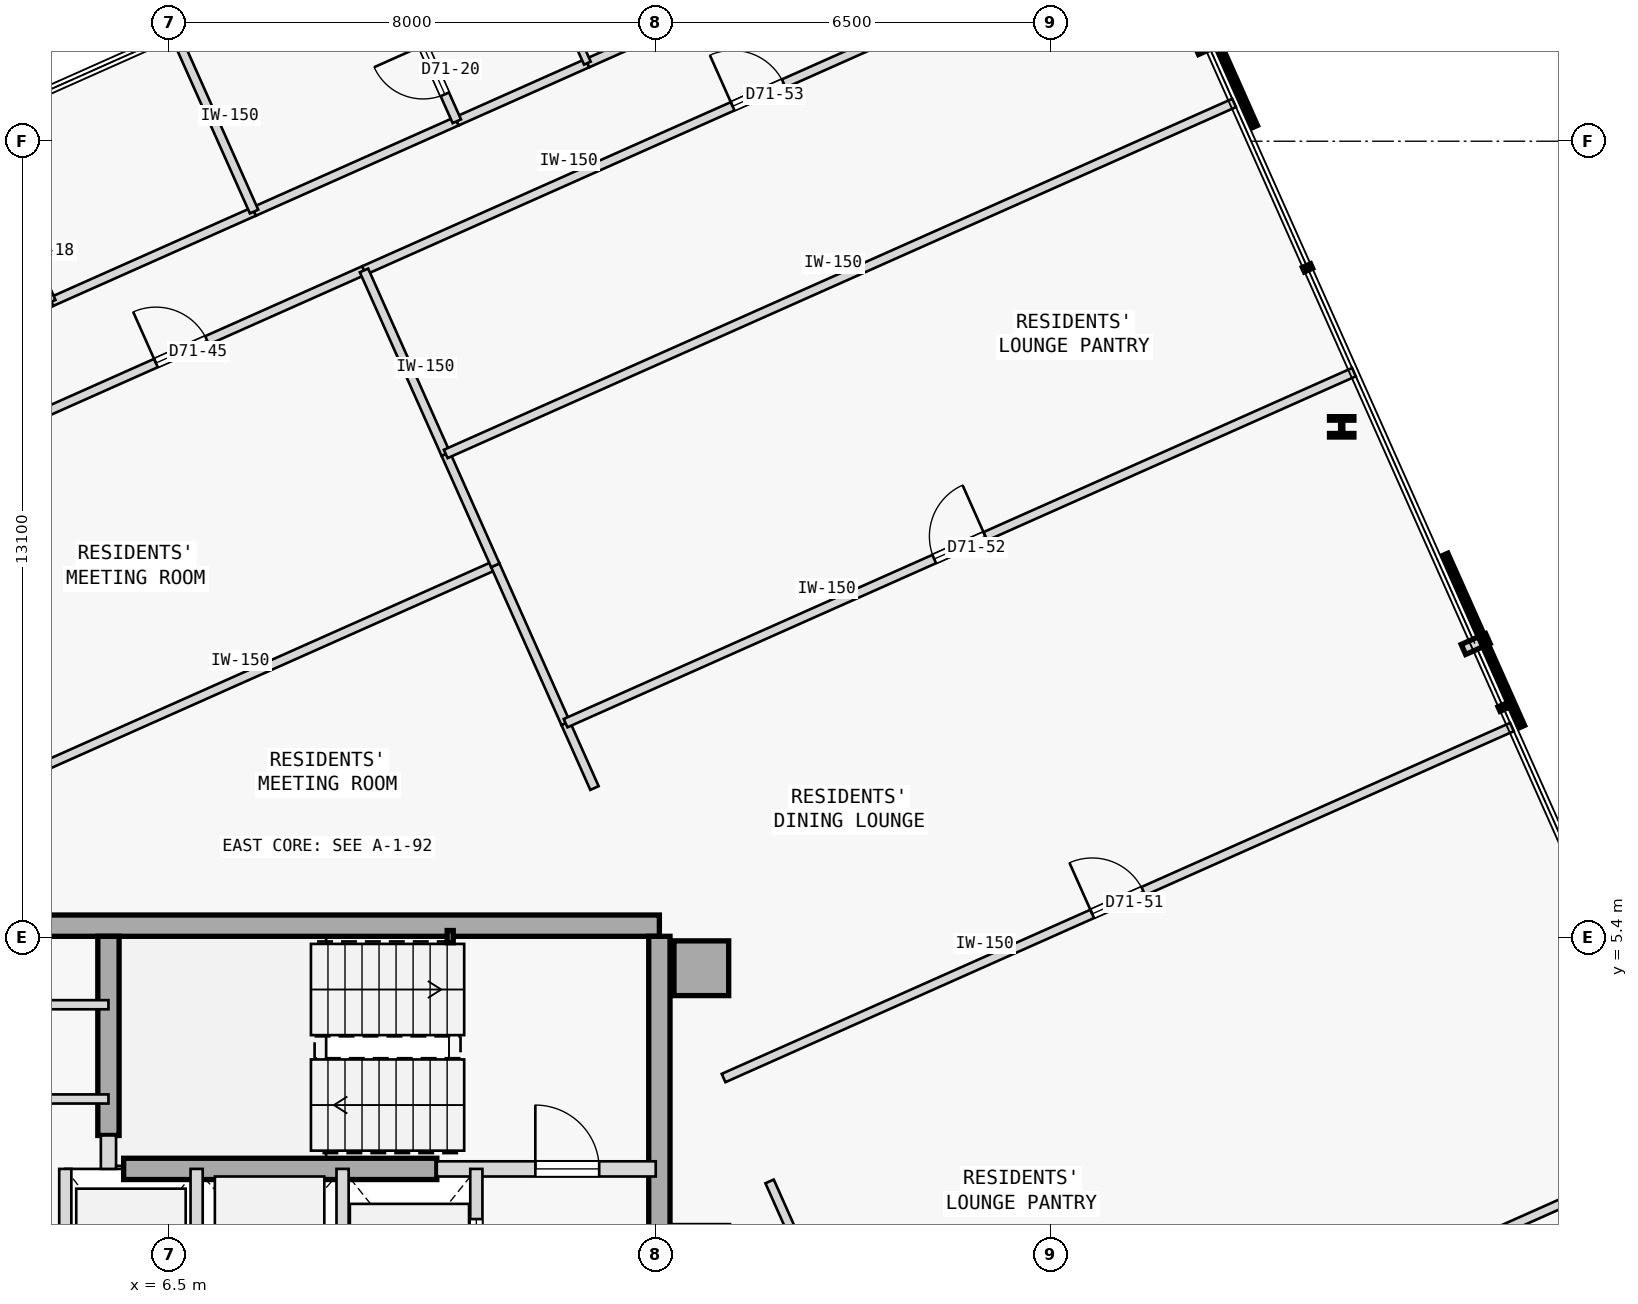
"""IFC4 building model, lengths in metres.
Left out: names, types, materials, properties, quantities, classifications, styles, units other than length and angle.
Written with IfcOpenShell. Run it as: python <this file> out.ifc"""

import sys

from ifc_helpers import new_model, si_unit, direction, frame, frame_2d, origin, origin_2d, place, context, subcontext, project, spatial, rectangle, hollow_rectangle, i_section, extrude, element, fill, save


model = new_model("IFC4")
c1 = context("Model", 3, precision=1e-05, world=origin(), true_north=direction((0.0, 1.0)))
c2 = subcontext(c1, "Body", "Model", "MODEL_VIEW")
j1 = project(units=[si_unit("LENGTHUNIT", "METRE"), si_unit("PLANEANGLEUNIT", "RADIAN")], contexts=[c1])
p1 = place(None, origin())
s1 = spatial("IfcSite", under=j1, at=p1, CompositionType="ELEMENT")
p2 = place(p1, origin())
s2 = spatial("IfcBuilding", under=s1, at=p2, CompositionType="ELEMENT")
p3 = place(p2, frame((0.0, 0.0, 265.55)))
s3 = spatial("IfcBuildingStorey", under=s2, at=p3, CompositionType="ELEMENT", Elevation=265.55)
p4 = place(p3, frame((15.25, 4.9, 0.0), z_axis=(0.0, 0.0, 1.0), x_axis=(1.0, 0.0, 0.0)))
e1 = element("IfcColumn", 1, at=p4, inside=s3, PredefinedType="COLUMN", context=c2, shape_type="SweptSolid", body=[
    extrude(rectangle(XDim=0.9, YDim=0.9, at=origin_2d()), origin(), (0.0, 0.0, 1.0), 3.35),
])
p5 = place(p3, frame((3.15, 5.6, 0.0), z_axis=(0.0, 0.0, 1.0), x_axis=(1.0, 0.0, 0.0)))
e2 = element("IfcWall", 2, at=p5, inside=s3, PredefinedType="SHEAR", context=c2, shape_type="SweptSolid", body=[
    extrude(rectangle(XDim=11.41, YDim=0.35, at=frame_2d((5.705, 0.0))), origin(), (0.0, 0.0, 1.0), 3.125),
])
p6 = place(p3, frame((14.56, -5.425, 0.0), z_axis=(0.0, 0.0, 1.0), x_axis=(0.0, 1.0, 0.0)))
e3 = element("IfcWall", 3, at=p6, inside=s3, PredefinedType="SHEAR", context=c2, shape_type="SweptSolid", body=[
    extrude(rectangle(XDim=10.85, YDim=0.35, at=frame_2d((5.425, 0.0))), origin(), (0.0, 0.0, 1.0), 3.125),
])
p7 = place(p3, frame((5.5, 2.15, 0.0), z_axis=(0.0, 0.0, 1.0), x_axis=(0.0, 1.0, 0.0)))
e4 = element("IfcWall", 4, at=p7, inside=s3, PredefinedType="SHEAR", context=c2, shape_type="SweptSolid", body=[
    extrude(rectangle(XDim=3.275, YDim=0.35, at=frame_2d((1.638, 0.0))), origin(), (0.0, 0.0, 1.0), 3.125),
])
p8 = place(p3, frame((5.75, 1.6, 0.0), z_axis=(0.0, 0.0, 1.0), x_axis=(1.0, 0.0, 0.0)))
e5 = element("IfcWall", 5, at=p8, inside=s3, PredefinedType="SHEAR", context=c2, shape_type="SweptSolid", body=[
    extrude(rectangle(XDim=5.15, YDim=0.35, at=frame_2d((2.575, 0.0))), origin(), (0.0, 0.0, 1.0), 3.125),
])
p9 = place(p3, frame((11.12, 5.42, 0.0), z_axis=(0.0, 0.0, 1.0), x_axis=(1.0, 0.0, 0.0)))
e6 = element("IfcColumn", 6, at=p9, inside=s3, PredefinedType="COLUMN", context=c2, shape_type="SweptSolid", body=[
    extrude(hollow_rectangle(XDim=0.1, YDim=0.2, WallThickness=0.008, at=origin_2d()), origin(), (0.0, 0.0, 1.0), 3.35),
])
p10 = place(p3, frame((25.781, 13.803, 0.0), z_axis=(0.0, 0.0, 1.0), x_axis=(1.0, 0.0, 0.0)))
e7 = element("IfcColumn", 7, at=p10, inside=s3, PredefinedType="COLUMN", context=c2, shape_type="SweptSolid", body=[
    extrude(i_section(OverallWidth=0.401, OverallDepth=0.335, WebThickness=0.036, FlangeThickness=0.058, FilletRadius=0.015, at=origin_2d()), origin(), (0.0, 0.0, 1.0), 3.35),
])
p11 = place(p3, frame((10.9, 1.6, 0.0), z_axis=(0.0, 0.0, 1.0), x_axis=(1.0, 0.0, 0.0)))
e8 = element("IfcWall", 8, at=p11, inside=s3, PredefinedType="STANDARD", context=c2, shape_type="SweptSolid", body=[
    extrude(rectangle(XDim=3.6, YDim=0.25, at=frame_2d((1.8, 0.0))), origin(), (0.0, 0.0, 1.0), 3.125),
])
p12 = place(p11, frame((1.62, 0.0, 0.0)))
e9 = element("IfcOpeningElement", 9, at=p12, cuts=e8, PredefinedType="OPENING", context=c2, shape_type="SweptSolid", body=[
    extrude(rectangle(XDim=1.05, YDim=2.15, at=frame_2d((0.525, 1.075))), frame((0.0, 0.135, 0.0), z_axis=(0.0, -1.0, 0.0), x_axis=(1.0, 0.0, 0.0)), (0.0, 0.0, 1.0), 0.27),
])
p13 = place(p3, frame((5.5, 1.6, 0.0), z_axis=(0.0, 0.0, 1.0), x_axis=(0.0, 1.0, 0.0)))
e10 = element("IfcWall", 10, at=p13, inside=s3, PredefinedType="STANDARD", context=c2, shape_type="SweptSolid", body=[
    extrude(rectangle(XDim=0.55, YDim=0.25, at=frame_2d((0.275, 0.0))), origin(), (0.0, 0.0, 1.0), 3.125),
])
p14 = place(p3, frame((11.55, -1.15, 0.0), z_axis=(0.0, 0.0, 1.0), x_axis=(0.0, 1.0, 0.0)))
e11 = element("IfcWall", 11, at=p14, inside=s3, PredefinedType="STANDARD", context=c2, shape_type="SweptSolid", body=[
    extrude(rectangle(XDim=2.75, YDim=0.2, at=frame_2d((1.375, 0.0))), origin(), (0.0, 0.0, 1.0), 3.125),
])
p15 = place(p14, frame((0.825, 0.0, 0.0)))
e12 = element("IfcOpeningElement", 12, at=p15, cuts=e11, PredefinedType="OPENING", context=c2, shape_type="SweptSolid", body=[
    extrude(rectangle(XDim=1.1, YDim=2.15, at=frame_2d((0.55, 1.075))), frame((0.0, 0.11, 0.0), z_axis=(0.0, -1.0, 0.0), x_axis=(1.0, 0.0, 0.0)), (0.0, 0.0, 1.0), 0.22),
])
for number, where, z_axis, x_axis in (
    (13, (9.35, -1.15, 0.0), (0.0, 0.0, 1.0), (0.0, 1.0, 0.0)),
    (14, (6.95, -1.15, 0.0), (0.0, 0.0, 1.0), (0.0, 1.0, 0.0)),
    (15, (4.79, -1.15, 0.0), (0.0, 0.0, 1.0), (0.0, 1.0, 0.0)),
):
    element("IfcWall", number, at=place(p3, frame(where, z_axis=z_axis, x_axis=x_axis)), inside=s3, PredefinedType="STANDARD", context=c2, shape_type="SweptSolid", body=[
        extrude(rectangle(XDim=2.75, YDim=0.2, at=frame_2d((1.375, 0.0))), origin(), (0.0, 0.0, 1.0), 3.125),
    ])
for number, where, z_axis, x_axis in (
    (16, (3.7, 4.3, 0.0), (0.0, 0.0, 1.0), (1.0, 0.0, 0.0)),
    (17, (3.7, 2.75, 0.0), (0.0, 0.0, 1.0), (1.0, 0.0, 0.0)),
):
    element("IfcWall", number, at=place(p3, frame(where, z_axis=z_axis, x_axis=x_axis)), inside=s3, PredefinedType="PARTITIONING", context=c2, shape_type="SweptSolid", body=[
        extrude(rectangle(XDim=1.8, YDim=0.15, at=frame_2d((0.9, 0.0))), origin(), (0.0, 0.0, 1.0), 3.125),
    ])
p16 = place(p3, frame((4.56, 15.859, 0.0), z_axis=(0.0, 0.0, 1.0), x_axis=(0.913543802, 0.40674036169, 0.0)))
e18 = element("IfcWall", 18, at=p16, inside=s3, PredefinedType="PARTITIONING", context=c2, shape_type="SweptSolid", body=[
    extrude(rectangle(XDim=3.65, YDim=0.15, at=frame_2d((1.825, 0.0))), origin(), (0.0, 0.0, 1.0), 3.125),
])
p17 = place(p3, frame((0.977, 14.264, 0.0), z_axis=(0.0, 0.0, 1.0), x_axis=(0.913549532696, 0.406727490232, 0.0)))
e19 = element("IfcWall", 19, at=p17, inside=s3, PredefinedType="PARTITIONING", context=c2, shape_type="SweptSolid", body=[
    extrude(rectangle(XDim=3.922, YDim=0.15, at=frame_2d((1.961, 0.0))), origin(), (0.0, 0.0, 1.0), 3.125),
])
p18 = place(p3, frame((7.895, 17.344, 0.0), z_axis=(0.0, 0.0, 1.0), x_axis=(0.913543802, 0.40674036169, 0.0)))
e20 = element("IfcWall", 20, at=p18, inside=s3, PredefinedType="PARTITIONING", context=c2, shape_type="SweptSolid", body=[
    extrude(rectangle(XDim=3.65, YDim=0.15, at=frame_2d((1.825, 0.0))), origin(), (0.0, 0.0, 1.0), 3.125),
])
p19 = place(p3, frame((11.229, 18.828, 0.0), z_axis=(0.0, 0.0, 1.0), x_axis=(0.913541436194, 0.406745675276, 0.0)))
e21 = element("IfcWall", 21, at=p19, inside=s3, PredefinedType="PARTITIONING", context=c2, shape_type="SweptSolid", body=[
    extrude(rectangle(XDim=2.35, YDim=0.15, at=frame_2d((1.175, 0.0))), origin(), (0.0, 0.0, 1.0), 3.125),
])
p20 = place(p3, frame((13.376, 19.784, 0.0), z_axis=(0.0, 0.0, 1.0), x_axis=(0.913545193015, 0.406737237438, 0.0)))
e22 = element("IfcWall", 22, at=p20, inside=s3, PredefinedType="PARTITIONING", context=c2, shape_type="SweptSolid", body=[
    extrude(rectangle(XDim=4.35, YDim=0.15, at=frame_2d((2.175, 0.0))), origin(), (0.0, 0.0, 1.0), 3.125),
])
p21 = place(p3, frame((3.7, 13.703, 0.0), z_axis=(0.0, 0.0, 1.0), x_axis=(0.913549363376, 0.406727870542, 0.0)))
e23 = element("IfcWall", 23, at=p21, inside=s3, PredefinedType="PARTITIONING", context=c2, shape_type="SweptSolid", body=[
    extrude(rectangle(XDim=6.571, YDim=0.15, at=frame_2d((3.286, 0.0))), origin(), (0.0, 0.0, 1.0), 3.125),
])
p22 = place(p21, frame((2.825, 0.0, 0.0)))
e24 = element("IfcOpeningElement", 24, at=p22, cuts=e23, PredefinedType="OPENING", context=c2, shape_type="SweptSolid", body=[
    extrude(rectangle(XDim=0.92, YDim=2.15, at=frame_2d((0.46, 1.075))), frame((0.0, 0.085, 0.0), z_axis=(0.0, -1.0, 0.0), x_axis=(1.0, 0.0, 0.0)), (0.0, 0.0, 1.0), 0.17),
])
p23 = place(p3, frame((18.662, -3.747, 0.0), z_axis=(0.0, 0.0, 1.0), x_axis=(0.913544622417, 0.406738519018, 0.0)))
e25 = element("IfcWall", 25, at=p23, inside=s3, PredefinedType="PARTITIONING", context=c2, shape_type="SweptSolid", body=[
    extrude(rectangle(XDim=14.192, YDim=0.15, at=frame_2d((7.096, 0.0))), origin(), (0.0, 0.0, 1.0), 3.125),
])
p24 = place(p23, frame((6.636, 0.0, 0.0)))
e26 = element("IfcOpeningElement", 26, at=p24, cuts=e25, PredefinedType="OPENING", context=c2, shape_type="SweptSolid", body=[
    extrude(rectangle(XDim=0.92, YDim=2.15, at=frame_2d((0.46, 1.075))), frame((0.0, 0.085, 0.0), z_axis=(0.0, -1.0, 0.0), x_axis=(1.0, 0.0, 0.0)), (0.0, 0.0, 1.0), 0.17),
])
p25 = place(p3, frame((9.703, 16.375, 0.0), z_axis=(0.0, 0.0, 1.0), x_axis=(0.913544622417, 0.406738519018, 0.0)))
e27 = element("IfcWall", 27, at=p25, inside=s3, PredefinedType="PARTITIONING", context=c2, shape_type="SweptSolid", body=[
    extrude(rectangle(XDim=14.192, YDim=0.15, at=frame_2d((7.096, 0.0))), origin(), (0.0, 0.0, 1.0), 3.125),
])
p26 = place(p25, frame((6.636, 0.0, 0.0)))
e28 = element("IfcOpeningElement", 28, at=p26, cuts=e27, PredefinedType="OPENING", context=c2, shape_type="SweptSolid", body=[
    extrude(rectangle(XDim=0.92, YDim=2.15, at=frame_2d((0.46, 1.075))), frame((0.0, 0.085, 0.0), z_axis=(0.0, -1.0, 0.0), x_axis=(1.0, 0.0, 0.0)), (0.0, 0.0, 1.0), 0.17),
])
p27 = place(p3, frame((4.56, 15.859, 0.0), z_axis=(0.0, 0.0, 1.0), x_axis=(-0.406701600856, 0.913561058639, 0.0)))
e29 = element("IfcWall", 29, at=p27, inside=s3, PredefinedType="PARTITIONING", context=c2, shape_type="SweptSolid", body=[
    extrude(rectangle(XDim=1.85, YDim=0.15, at=frame_2d((0.925, 0.0))), origin(), (0.0, 0.0, 1.0), 3.125),
])
p28 = place(p27, frame((0.475, 0.0, 0.0)))
e30 = element("IfcOpeningElement", 30, at=p28, cuts=e29, PredefinedType="OPENING", context=c2, shape_type="SweptSolid", body=[
    extrude(rectangle(XDim=0.9, YDim=2.15, at=frame_2d((0.45, 1.075))), frame((0.0, 0.085, 0.0), z_axis=(0.0, -1.0, 0.0), x_axis=(1.0, 0.0, 0.0)), (0.0, 0.0, 1.0), 0.17),
])
p29 = place(p3, frame((7.895, 17.344, 0.0), z_axis=(0.0, 0.0, 1.0), x_axis=(-0.406733350739, 0.913546923478, 0.0)))
e31 = element("IfcWall", 31, at=p29, inside=s3, PredefinedType="PARTITIONING", context=c2, shape_type="SweptSolid", body=[
    extrude(rectangle(XDim=3.198, YDim=0.15, at=frame_2d((1.599, 0.0))), origin(), (0.0, 0.0, 1.0), 3.125),
])
p30 = place(p3, frame((11.229, 18.828, 0.0), z_axis=(0.0, 0.0, 1.0), x_axis=(-0.406750635596, 0.913539227643, 0.0)))
e32 = element("IfcWall", 32, at=p30, inside=s3, PredefinedType="PARTITIONING", context=c2, shape_type="SweptSolid", body=[
    extrude(rectangle(XDim=1.85, YDim=0.15, at=frame_2d((0.925, 0.0))), origin(), (0.0, 0.0, 1.0), 3.125),
])
p31 = place(p30, frame((0.485, 0.0, 0.0)))
e33 = element("IfcOpeningElement", 33, at=p31, cuts=e32, PredefinedType="OPENING", context=c2, shape_type="SweptSolid", body=[
    extrude(rectangle(XDim=0.88, YDim=2.15, at=frame_2d((0.44, 1.075))), frame((0.0, 0.085, 0.0), z_axis=(0.0, -1.0, 0.0), x_axis=(1.0, 0.0, 0.0)), (0.0, 0.0, 1.0), 0.17),
])
p32 = place(p3, frame((13.376, 19.784, 0.0), z_axis=(0.0, 0.0, 1.0), x_axis=(-0.406750635596, 0.913539227643, 0.0)))
e34 = element("IfcWall", 34, at=p32, inside=s3, PredefinedType="PARTITIONING", context=c2, shape_type="SweptSolid", body=[
    extrude(rectangle(XDim=1.85, YDim=0.12, at=frame_2d((0.925, 0.0))), origin(), (0.0, 0.0, 1.0), 3.125),
])
p33 = place(p3, frame((17.788, -1.784, 0.0), z_axis=(0.0, 0.0, 1.0), x_axis=(-0.40673740295, 0.913545119324, 0.0)))
e35 = element("IfcWall", 35, at=p33, inside=s3, PredefinedType="PARTITIONING", context=c2, shape_type="SweptSolid", body=[
    extrude(rectangle(XDim=3.479, YDim=0.15, at=frame_2d((1.74, 0.0))), origin(), (0.0, 0.0, 1.0), 3.125),
])
p34 = place(p3, frame((3.7, 7.893, 0.0), z_axis=(0.0, 0.0, 1.0), x_axis=(0.913545406364, 0.406736758251, 0.0)))
e36 = element("IfcWall", 36, at=p34, inside=s3, PredefinedType="PARTITIONING", context=c2, shape_type="SweptSolid", body=[
    extrude(rectangle(XDim=8.934, YDim=0.15, at=frame_2d((4.467, 0.0))), origin(), (0.0, 0.0, 1.0), 3.125),
])
p35 = place(p3, frame((13.493, 7.863, 0.0), z_axis=(0.0, 0.0, 1.0), x_axis=(-0.406720145117, 0.913552802829, 0.0)))
e37 = element("IfcWall", 37, at=p35, inside=s3, PredefinedType="PARTITIONING", context=c2, shape_type="SweptSolid", body=[
    extrude(rectangle(XDim=1.168, YDim=0.15, at=frame_2d((0.584, 0.0))), origin(), (0.0, 0.0, 1.0), 3.125),
])
p36 = place(p3, frame((13.018, 8.93, 0.0), z_axis=(0.0, 0.0, 1.0), x_axis=(-0.406768056625, 0.913531470782, 0.0)))
e38 = element("IfcWall", 38, at=p36, inside=s3, PredefinedType="PARTITIONING", context=c2, shape_type="SweptSolid", body=[
    extrude(rectangle(XDim=2.842, YDim=0.15, at=frame_2d((1.421, 0.0))), origin(), (0.0, 0.0, 1.0), 3.125),
])
p37 = place(p3, frame((11.862, 11.526, 0.0), z_axis=(0.0, 0.0, 1.0), x_axis=(-0.406760035505, 0.913535042303, 0.0)))
e39 = element("IfcWall", 39, at=p37, inside=s3, PredefinedType="PARTITIONING", context=c2, shape_type="SweptSolid", body=[
    extrude(rectangle(XDim=2.004, YDim=0.15, at=frame_2d((1.002, 0.0))), origin(), (0.0, 0.0, 1.0), 3.125),
])
p38 = place(p3, frame((11.046, 13.357, 0.0), z_axis=(0.0, 0.0, 1.0), x_axis=(-0.406714303965, 0.913555403328, 0.0)))
e40 = element("IfcWall", 40, at=p38, inside=s3, PredefinedType="PARTITIONING", context=c2, shape_type="SweptSolid", body=[
    extrude(rectangle(XDim=3.304, YDim=0.15, at=frame_2d((1.652, 0.0))), origin(), (0.0, 0.0, 1.0), 3.125),
])
p39 = place(p3, frame((15.616, 3.094, 0.0), z_axis=(0.0, 0.0, 1.0), x_axis=(0.913551014388, 0.406724162191, 0.0)))
e41 = element("IfcWall", 41, at=p39, inside=s3, PredefinedType="PARTITIONING", context=c2, shape_type="SweptSolid", body=[
    extrude(rectangle(XDim=14.192, YDim=0.15, at=frame_2d((7.096, 0.0))), origin(), (0.0, 0.0, 1.0), 3.125),
])
p40 = place(p39, frame((6.636, 0.0, 0.0)))
e42 = element("IfcOpeningElement", 42, at=p40, cuts=e41, PredefinedType="OPENING", context=c2, shape_type="SweptSolid", body=[
    extrude(rectangle(XDim=0.92, YDim=2.15, at=frame_2d((0.46, 1.075))), frame((0.0, 0.085, 0.0), z_axis=(0.0, -1.0, 0.0), x_axis=(1.0, 0.0, 0.0)), (0.0, 0.0, 1.0), 0.17),
])
p41 = place(p3, frame((13.018, 8.93, 0.0), z_axis=(0.0, 0.0, 1.0), x_axis=(0.913551014388, 0.406724162191, 0.0)))
e43 = element("IfcWall", 43, at=p41, inside=s3, PredefinedType="PARTITIONING", context=c2, shape_type="SweptSolid", body=[
    extrude(rectangle(XDim=14.192, YDim=0.15, at=frame_2d((7.096, 0.0))), origin(), (0.0, 0.0, 1.0), 3.125),
])
p42 = place(p41, frame((6.636, 0.0, 0.0)))
e44 = element("IfcOpeningElement", 44, at=p42, cuts=e43, PredefinedType="OPENING", context=c2, shape_type="SweptSolid", body=[
    extrude(rectangle(XDim=0.92, YDim=2.15, at=frame_2d((0.46, 1.075))), frame((0.0, 0.085, 0.0), z_axis=(0.0, -1.0, 0.0), x_axis=(1.0, 0.0, 0.0)), (0.0, 0.0, 1.0), 0.17),
])
p43 = place(p3, frame((11.046, 13.357, 0.0), z_axis=(0.0, 0.0, 1.0), x_axis=(0.913553860075, 0.406717770379, 0.0)))
e45 = element("IfcWall", 45, at=p43, inside=s3, PredefinedType="PARTITIONING", context=c2, shape_type="SweptSolid", body=[
    extrude(rectangle(XDim=14.192, YDim=0.15, at=frame_2d((7.096, 0.0))), origin(), (0.0, 0.0, 1.0), 3.125),
])
p44 = place(p12, origin())
e46 = element("IfcDoor", 46, at=p44, inside=s3, OperationType="SINGLE_SWING_LEFT", PredefinedType="DOOR", context=c2, shape_type="SweptSolid", body=[
    extrude(rectangle(XDim=1.05, YDim=2.15, at=frame_2d((0.525, 1.075))), frame((0.0, 0.025, 0.0), z_axis=(0.0, -1.0, 0.0), x_axis=(1.0, 0.0, 0.0)), (0.0, 0.0, 1.0), 0.05),
])
fill(e9, e46)
p45 = place(p15, origin())
e47 = element("IfcDoor", 47, at=p45, inside=s3, OperationType="SLIDING_TO_RIGHT", PredefinedType="DOOR", context=c2, shape_type="SweptSolid", body=[
    extrude(rectangle(XDim=1.1, YDim=2.15, at=frame_2d((0.55, 1.075))), frame((0.0, 0.025, 0.0), z_axis=(0.0, -1.0, 0.0), x_axis=(1.0, 0.0, 0.0)), (0.0, 0.0, 1.0), 0.05),
])
fill(e12, e47)
p46 = place(p31, origin())
e48 = element("IfcDoor", 48, at=p46, inside=s3, OperationType="SINGLE_SWING_RIGHT", PredefinedType="DOOR", context=c2, shape_type="SweptSolid", body=[
    extrude(rectangle(XDim=0.88, YDim=2.15, at=frame_2d((0.44, 1.075))), frame((0.0, 0.025, 0.0), z_axis=(0.0, -1.0, 0.0), x_axis=(1.0, 0.0, 0.0)), (0.0, 0.0, 1.0), 0.05),
])
fill(e33, e48)
p47 = place(p22, origin())
e49 = element("IfcDoor", 49, at=p47, inside=s3, OperationType="SINGLE_SWING_LEFT", PredefinedType="DOOR", context=c2, shape_type="SweptSolid", body=[
    extrude(rectangle(XDim=0.92, YDim=2.15, at=frame_2d((0.46, 1.075))), frame((0.0, 0.025, 0.0), z_axis=(0.0, -1.0, 0.0), x_axis=(1.0, 0.0, 0.0)), (0.0, 0.0, 1.0), 0.05),
])
fill(e24, e49)
p48 = place(p40, origin())
e50 = element("IfcDoor", 50, at=p48, inside=s3, OperationType="SINGLE_SWING_LEFT", PredefinedType="DOOR", context=c2, shape_type="SweptSolid", body=[
    extrude(rectangle(XDim=0.92, YDim=2.15, at=frame_2d((0.46, 1.075))), frame((0.0, 0.025, 0.0), z_axis=(0.0, -1.0, 0.0), x_axis=(1.0, 0.0, 0.0)), (0.0, 0.0, 1.0), 0.05),
])
fill(e42, e50)
p49 = place(p42, origin())
e51 = element("IfcDoor", 51, at=p49, inside=s3, OperationType="SINGLE_SWING_RIGHT", PredefinedType="DOOR", context=c2, shape_type="SweptSolid", body=[
    extrude(rectangle(XDim=0.92, YDim=2.15, at=frame_2d((0.46, 1.075))), frame((0.0, 0.025, 0.0), z_axis=(0.0, -1.0, 0.0), x_axis=(1.0, 0.0, 0.0)), (0.0, 0.0, 1.0), 0.05),
])
fill(e44, e51)
p50 = place(p26, origin())
e52 = element("IfcDoor", 52, at=p50, inside=s3, OperationType="SINGLE_SWING_LEFT", PredefinedType="DOOR", context=c2, shape_type="SweptSolid", body=[
    extrude(rectangle(XDim=0.92, YDim=2.15, at=frame_2d((0.46, 1.075))), frame((0.0, 0.025, 0.0), z_axis=(0.0, -1.0, 0.0), x_axis=(1.0, 0.0, 0.0)), (0.0, 0.0, 1.0), 0.05),
])
fill(e28, e52)
save(model, sys.argv[1])
